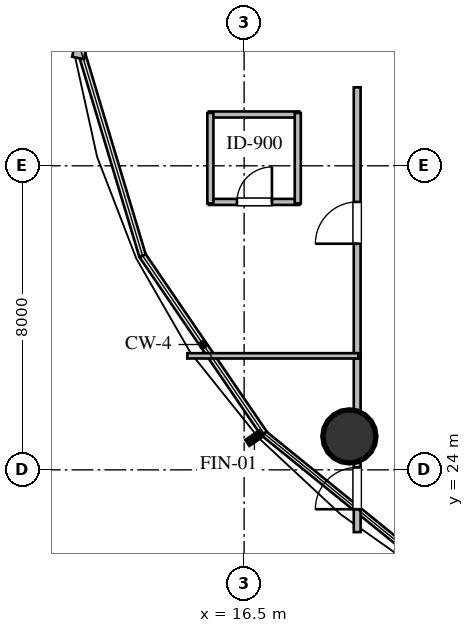
"""IFC4 building model, lengths in metres.
Left out: names, types, materials, properties, quantities, classifications, styles, units other than length and angle.
Written with IfcOpenShell. Run it as: python <this file> out.ifc"""

import sys

from ifc_helpers import new_model, si_unit, direction, frame, frame_2d, origin, origin_2d, place, context, subcontext, project, spatial, rectangle, circle, extrude, element, fill, save


model = new_model("IFC4")
c1 = context("Model", 3, precision=1e-05, world=origin(), true_north=direction((0.0, 1.0)))
c2 = subcontext(c1, "Body", "Model", "MODEL_VIEW")
j1 = project(units=[si_unit("LENGTHUNIT", "METRE"), si_unit("PLANEANGLEUNIT", "RADIAN")], contexts=[c1])
p1 = place(None, origin())
s1 = spatial("IfcSite", under=j1, at=p1, CompositionType="ELEMENT")
p2 = place(p1, origin())
s2 = spatial("IfcBuilding", under=s1, at=p2, CompositionType="ELEMENT")
p3 = place(p2, frame((0.0, 0.0, 81.6)))
s3 = spatial("IfcBuildingStorey", under=s2, at=p3, CompositionType="ELEMENT", Elevation=81.6)
p4 = place(p3, frame((19.27, 24.88, 0.0), z_axis=(0.0, 0.0, 1.0), x_axis=(1.0, 0.0, 0.0)))
e1 = element("IfcColumn", 1, at=p4, inside=s3, PredefinedType="COLUMN", context=c2, shape_type="SweptSolid", body=[
    extrude(circle(Radius=0.7, at=origin_2d()), origin(), (0.0, 0.0, 1.0), 3.6),
])
p5 = place(p3, frame((12.132, 34.837, 0.0), z_axis=(0.0, 0.0, 1.0), x_axis=(0.210310821848, 0.977634572943, 0.0)))
e2 = element("IfcWall", 2, at=p5, inside=s3, PredefinedType="STANDARD", context=c2, shape_type="SweptSolid", body=[
    extrude(rectangle(XDim=15.163, YDim=0.32, at=frame_2d((7.582, 0.0))), origin(), (0.0, 0.0, 1.0), 2.738),
])
p6 = place(p3, frame((15.572, 31.05, 0.0), z_axis=(0.0, 0.0, 1.0), x_axis=(1.0, 0.0, 0.0)))
e3 = element("IfcWall", 3, at=p6, inside=s3, PredefinedType="PLUMBINGWALL", context=c2, shape_type="SweptSolid", body=[
    extrude(rectangle(XDim=2.38, YDim=0.16, at=frame_2d((1.19, 0.0))), origin(), (0.0, 0.0, 1.0), 3.36),
])
p7 = place(p6, frame((0.74, 0.0, 0.0)))
e4 = element("IfcOpeningElement", 4, at=p7, cuts=e3, PredefinedType="OPENING", context=c2, shape_type="SweptSolid", body=[
    extrude(rectangle(XDim=0.92, YDim=2.1, at=frame_2d((0.46, 1.05))), frame((0.0, 0.09, 0.0), z_axis=(0.0, -1.0, 0.0), x_axis=(1.0, 0.0, 0.0)), (0.0, 0.0, 1.0), 0.18),
])
for number, where, z_axis, x_axis in (
    (5, (15.572, 33.35, 0.0), (0.0, 0.0, 1.0), (1.0, 0.0, 0.0)),
    (6, (15.612, 31.01, 0.0), (0.0, 0.0, 1.0), (0.0, 1.0, 0.0)),
):
    element("IfcWall", number, at=place(p3, frame(where, z_axis=z_axis, x_axis=x_axis)), inside=s3, PredefinedType="PLUMBINGWALL", context=c2, shape_type="SweptSolid", body=[
        extrude(rectangle(XDim=2.38, YDim=0.16, at=frame_2d((1.19, 0.0))), origin(), (0.0, 0.0, 1.0), 3.36),
    ])
p8 = place(p3, frame((17.912, 31.01, 0.0), z_axis=(0.0, 0.0, 1.0), x_axis=(0.0, 1.0, 0.0)))
e7 = element("IfcWall", 7, at=p8, inside=s3, PredefinedType="PLUMBINGWALL", context=c2, shape_type="SweptSolid", body=[
    extrude(rectangle(XDim=2.38, YDim=0.16, at=frame_2d((1.19, 0.0))), origin(), (0.0, 0.0, 1.0), 2.738),
])
p9 = place(p3, frame((19.475, 22.362, 0.0), z_axis=(0.0, 0.0, 1.0), x_axis=(0.0, 1.0, 0.0)))
e8 = element("IfcWall", 8, at=p9, inside=s3, PredefinedType="PARTITIONING", context=c2, shape_type="SweptSolid", body=[
    extrude(rectangle(XDim=4.703, YDim=0.18, at=frame_2d((2.352, 0.0))), origin(), (0.0, 0.0, 1.0), 2.738),
])
p10 = place(p9, frame((0.602, 0.0, 0.0)))
e9 = element("IfcOpeningElement", 9, at=p10, cuts=e8, PredefinedType="OPENING", context=c2, shape_type="SweptSolid", body=[
    extrude(rectangle(XDim=1.1, YDim=2.1, at=frame_2d((0.55, 1.05))), frame((0.0, 0.1, 0.0), z_axis=(0.0, -1.0, 0.0), x_axis=(1.0, 0.0, 0.0)), (0.0, 0.0, 1.0), 0.2),
])
p11 = place(p3, frame((19.475, 26.935, 0.0), z_axis=(0.0, 0.0, 1.0), x_axis=(0.0, 1.0, 0.0)))
e10 = element("IfcWall", 10, at=p11, inside=s3, PredefinedType="PARTITIONING", context=c2, shape_type="SweptSolid", body=[
    extrude(rectangle(XDim=7.13, YDim=0.18, at=frame_2d((3.565, 0.0))), origin(), (0.0, 0.0, 1.0), 3.36),
])
p12 = place(p11, frame((3.015, 0.0, 0.0)))
e11 = element("IfcOpeningElement", 11, at=p12, cuts=e10, PredefinedType="OPENING", context=c2, shape_type="SweptSolid", body=[
    extrude(rectangle(XDim=1.1, YDim=2.1, at=frame_2d((0.55, 1.05))), frame((0.0, 0.1, 0.0), z_axis=(0.0, -1.0, 0.0), x_axis=(1.0, 0.0, 0.0)), (0.0, 0.0, 1.0), 0.2),
])
p13 = place(p3, frame((15.006, 27.0, 0.0), z_axis=(0.0, 0.0, 1.0), x_axis=(1.0, 0.0, 0.0)))
e12 = element("IfcWall", 12, at=p13, inside=s3, PredefinedType="PARTITIONING", context=c2, shape_type="SweptSolid", body=[
    extrude(rectangle(XDim=4.499, YDim=0.14, at=frame_2d((2.25, 0.0))), origin(), (0.0, 0.0, 1.0), 3.36),
])
p14 = place(p7, origin())
e13 = element("IfcDoor", 13, at=p14, inside=s3, OperationType="SINGLE_SWING_RIGHT", PredefinedType="DOOR", context=c2, shape_type="SweptSolid", body=[
    extrude(rectangle(XDim=0.92, YDim=2.1, at=frame_2d((0.46, 1.05))), frame((0.0, 0.025, 0.0), z_axis=(0.0, -1.0, 0.0), x_axis=(1.0, 0.0, 0.0)), (0.0, 0.0, 1.0), 0.05),
])
fill(e4, e13)
p15 = place(p10, origin())
e14 = element("IfcDoor", 14, at=p15, inside=s3, OperationType="SINGLE_SWING_LEFT", PredefinedType="DOOR", context=c2, shape_type="SweptSolid", body=[
    extrude(rectangle(XDim=1.1, YDim=2.1, at=frame_2d((0.55, 1.05))), frame((0.0, 0.025, 0.0), z_axis=(0.0, -1.0, 0.0), x_axis=(1.0, 0.0, 0.0)), (0.0, 0.0, 1.0), 0.05),
])
fill(e9, e14)
p16 = place(p12, origin())
e15 = element("IfcDoor", 15, at=p16, inside=s3, OperationType="SINGLE_SWING_LEFT", PredefinedType="DOOR", context=c2, shape_type="SweptSolid", body=[
    extrude(rectangle(XDim=1.1, YDim=2.1, at=frame_2d((0.55, 1.05))), frame((0.0, 0.025, 0.0), z_axis=(0.0, -1.0, 0.0), x_axis=(1.0, 0.0, 0.0)), (0.0, 0.0, 1.0), 0.05),
])
fill(e11, e15)
save(model, sys.argv[1])
